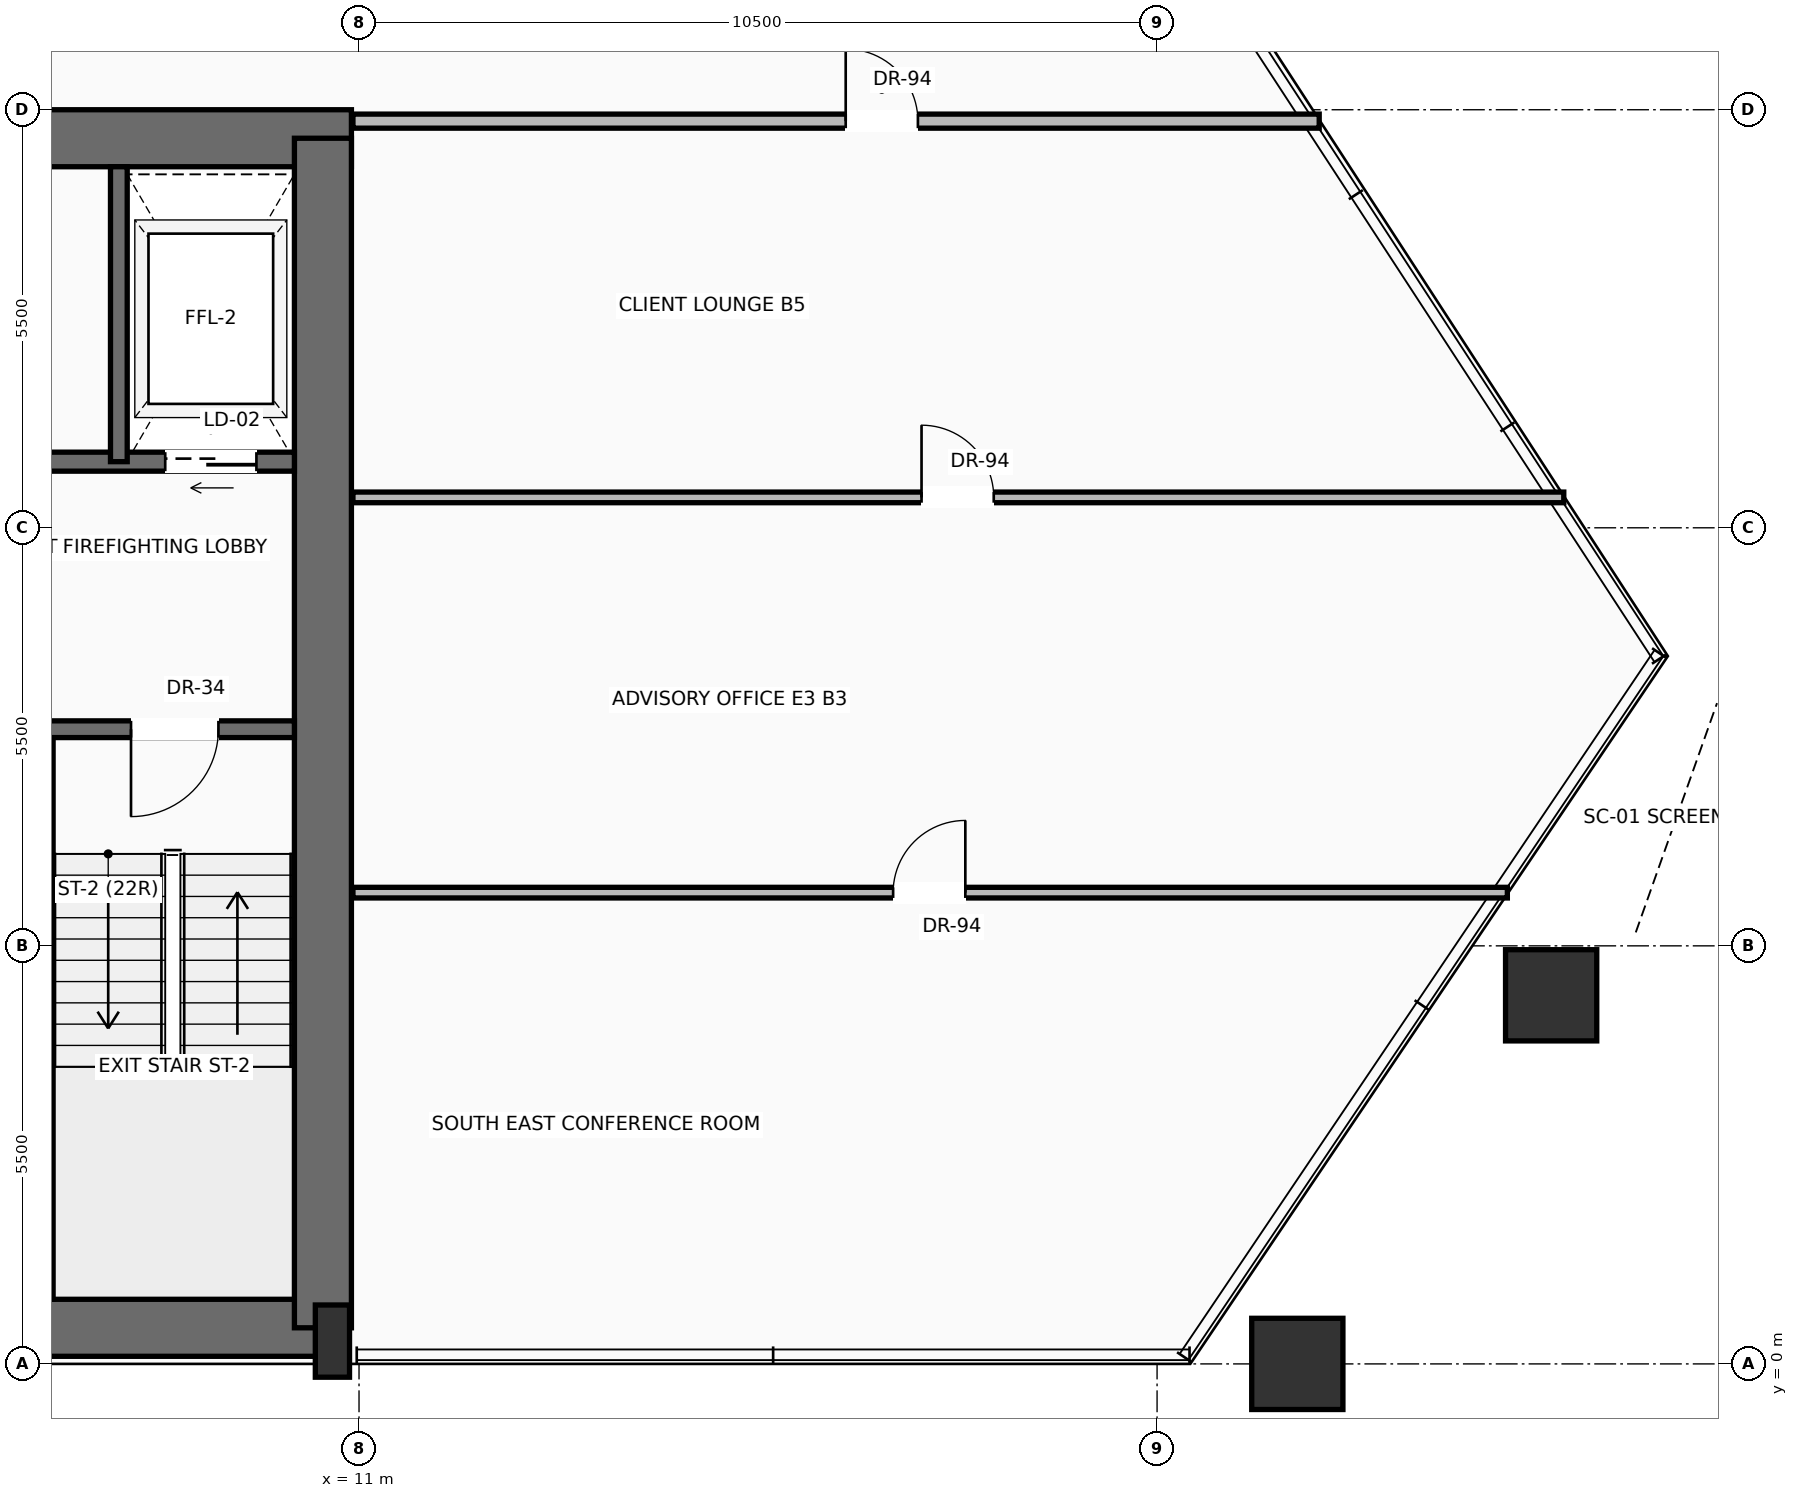
"""IFC4 building model, lengths in metres.
Left out: names, types, materials, properties, quantities, classifications, styles, units other than length and angle.
Written with IfcOpenShell. Run it as: python <this file> out.ifc"""

import sys

from ifc_helpers import new_model, si_unit, direction, frame, frame_2d, origin, origin_2d, place, context, subcontext, project, spatial, rectangle, hollow_rectangle, extrude, source, transform, mapped, element, fill, save


model = new_model("IFC4")
c1 = context("Model", 3, precision=1e-05, world=origin(), true_north=direction((0.0, 1.0)))
c2 = subcontext(c1, "Body", "Model", "MODEL_VIEW")
j1 = project(units=[si_unit("LENGTHUNIT", "METRE"), si_unit("PLANEANGLEUNIT", "RADIAN")], contexts=[c1])
p1 = place(None, origin())
s1 = spatial("IfcSite", under=j1, at=p1, CompositionType="ELEMENT")
p2 = place(p1, origin())
s2 = spatial("IfcBuilding", under=s1, at=p2, CompositionType="ELEMENT")
p3 = place(p2, frame((0.0, 0.0, 87.7)))
s3 = spatial("IfcBuildingStorey", under=s2, at=p3, CompositionType="ELEMENT", Elevation=87.7)
p4 = place(p3, frame((-10.65, 0.475, 0.0), z_axis=(0.0, 0.0, 1.0), x_axis=(1.0, 0.0, 0.0)))
e1 = element("IfcWall", 1, at=p4, inside=s3, PredefinedType="SHEAR", context=c2, shape_type="SweptSolid", body=[
    extrude(rectangle(XDim=21.3, YDim=0.75, at=frame_2d((10.65, 0.0))), origin(), (0.0, 0.0, 1.0), 3.45),
])
p5 = place(p3, frame((-10.9, 16.125, 0.0), z_axis=(0.0, 0.0, 1.0), x_axis=(1.0, 0.0, 0.0)))
e2 = element("IfcWall", 2, at=p5, inside=s3, PredefinedType="SHEAR", context=c2, shape_type="SweptSolid", body=[
    extrude(rectangle(XDim=21.8, YDim=0.75, at=frame_2d((10.9, 0.0))), origin(), (0.0, 0.0, 1.0), 3.45),
])
p6 = place(p5, frame((3.47, 0.0, 0.0)))
e3 = element("IfcOpeningElement", 3, at=p6, cuts=e2, PredefinedType="OPENING", context=c2, shape_type="SweptSolid", body=[
    extrude(rectangle(XDim=1.3, YDim=2.3, at=frame_2d((0.65, 1.15))), frame((0.0, 0.385, 0.0), z_axis=(0.0, -1.0, 0.0), x_axis=(1.0, 0.0, 0.0)), (0.0, 0.0, 1.0), 0.77),
])
p7 = place(p5, frame((9.9, 0.0, 0.0)))
e4 = element("IfcOpeningElement", 4, at=p7, cuts=e2, PredefinedType="OPENING", context=c2, shape_type="SweptSolid", body=[
    extrude(rectangle(XDim=2.0, YDim=2.4, at=frame_2d((1.0, 1.2))), frame((0.0, 0.385, 0.0), z_axis=(0.0, -1.0, 0.0), x_axis=(1.0, 0.0, 0.0)), (0.0, 0.0, 1.0), 0.77),
])
p8 = place(p3, frame((10.525, 0.475, 0.0), z_axis=(0.0, 0.0, 1.0), x_axis=(0.0, 1.0, 0.0)))
e5 = element("IfcWall", 5, at=p8, inside=s3, PredefinedType="SHEAR", context=c2, shape_type="SweptSolid", body=[
    extrude(rectangle(XDim=15.65, YDim=0.75, at=frame_2d((7.825, 0.0))), origin(), (0.0, 0.0, 1.0), 3.45),
])
m1 = source(origin(), c2, "Body", "SweptSolid", [
    extrude(rectangle(XDim=0.45, YDim=0.95, at=origin_2d()), origin(), (0.0, 0.0, 1.0), 3.7),
])
p9 = place(p3, frame((10.65, 0.3, 0.0), z_axis=(0.0, 0.0, 1.0), x_axis=(1.0, 0.0, 0.0)))
e6 = element("IfcColumn", 6, at=p9, inside=s3, PredefinedType="PILASTER", context=c2, shape_type="MappedRepresentation", body=[
    mapped(m1, transform((0.0, 0.0, 0.0), scale=1.0)),
])
m2 = source(origin(), c2, "Body", "SweptSolid", [
    extrude(hollow_rectangle(XDim=1.2, YDim=1.2, WallThickness=0.06, at=origin_2d()), origin(), (0.0, 0.0, 1.0), 3.691),
])
p10 = place(p3, frame((23.345, 0.0, 0.004), z_axis=(0.01256597649, 0.0, 0.999921045), x_axis=(0.0, 1.0, 0.0)))
e7 = element("IfcColumn", 7, at=p10, inside=s3, PredefinedType="COLUMN", context=c2, shape_type="MappedRepresentation", body=[
    mapped(m2, transform((0.0, 0.0, 0.0), scale=1.0)),
])
m3 = source(origin(), c2, "Body", "SweptSolid", [
    extrude(hollow_rectangle(XDim=1.2, YDim=1.2, WallThickness=0.06, at=origin_2d()), origin(), (0.0, 0.0, 1.0), 3.692),
])
p11 = place(p3, frame((26.685, 4.849, 0.004), z_axis=(0.000264533588, -0.016070415444, 0.999870827542), x_axis=(0.999864546824, 0.016458675668, 0.0)))
e8 = element("IfcColumn", 8, at=p11, inside=s3, PredefinedType="COLUMN", context=c2, shape_type="MappedRepresentation", body=[
    mapped(m3, transform((0.0, 0.0, 0.0), scale=1.0)),
])
p12 = place(p3, frame((6.85, 0.85, 0.0), z_axis=(0.0, 0.0, 1.0), x_axis=(0.0, 1.0, 0.0)))
e9 = element("IfcWall", 9, at=p12, inside=s3, PredefinedType="SOLIDWALL", context=c2, shape_type="SweptSolid", body=[
    extrude(rectangle(XDim=7.5, YDim=0.25, at=frame_2d((3.75, 0.0))), origin(), (0.0, 0.0, 1.0), 3.45),
])
p13 = place(p3, frame((10.15, 8.35, 0.0), z_axis=(0.0, 0.0, 1.0), x_axis=(-1.0, 0.0, 0.0)))
e10 = element("IfcWall", 10, at=p13, inside=s3, PredefinedType="SOLIDWALL", context=c2, shape_type="SweptSolid", body=[
    extrude(rectangle(XDim=4.65, YDim=0.22, at=frame_2d((2.325, 0.0))), origin(), (0.0, 0.0, 1.0), 3.45),
])
p14 = place(p13, frame((1.0, 0.0, 0.0)))
e11 = element("IfcOpeningElement", 11, at=p14, cuts=e10, PredefinedType="OPENING", context=c2, shape_type="SweptSolid", body=[
    extrude(rectangle(XDim=1.15, YDim=2.2, at=frame_2d((0.575, 1.1))), frame((0.0, 0.12, 0.0), z_axis=(0.0, -1.0, 0.0), x_axis=(1.0, 0.0, 0.0)), (0.0, 0.0, 1.0), 0.24),
])
p15 = place(p3, frame((10.15, 11.87, 0.0), z_axis=(0.0, 0.0, 1.0), x_axis=(-1.0, 0.0, 0.0)))
e12 = element("IfcWall", 12, at=p15, inside=s3, PredefinedType="SOLIDWALL", context=c2, shape_type="SweptSolid", body=[
    extrude(rectangle(XDim=4.65, YDim=0.25, at=frame_2d((2.325, 0.0))), origin(), (0.0, 0.0, 1.0), 3.45),
])
p16 = place(p15, frame((0.5, 0.0, 0.0)))
e13 = element("IfcOpeningElement", 13, at=p16, cuts=e12, PredefinedType="OPENING", context=c2, shape_type="SweptSolid", body=[
    extrude(rectangle(XDim=1.2, YDim=2.25, at=frame_2d((0.6, 1.125))), frame((0.0, 0.135, 0.0), z_axis=(0.0, -1.0, 0.0), x_axis=(1.0, 0.0, 0.0)), (0.0, 0.0, 1.0), 0.27),
])
p17 = place(p3, frame((7.84, 11.87, 0.0), z_axis=(0.0, 0.0, 1.0), x_axis=(0.0, 1.0, 0.0)))
e14 = element("IfcWall", 14, at=p17, inside=s3, PredefinedType="SOLIDWALL", context=c2, shape_type="SweptSolid", body=[
    extrude(rectangle(XDim=3.88, YDim=0.22, at=frame_2d((1.94, 0.0))), origin(), (0.0, 0.0, 1.0), 3.45),
])
p18 = place(p3, frame((10.92, 16.35, 0.0), z_axis=(0.0, 0.0, 1.0), x_axis=(1.0, 0.0, 0.0)))
e15 = element("IfcWall", 15, at=p18, inside=s3, PredefinedType="PARTITIONING", context=c2, shape_type="SweptSolid", body=[
    extrude(rectangle(XDim=12.713, YDim=0.185, at=frame_2d((6.357, 0.0))), origin(), (0.0, 0.0, 1.0), 2.747),
])
p19 = place(p18, frame((6.483, 0.0, 0.0)))
e16 = element("IfcOpeningElement", 16, at=p19, cuts=e15, PredefinedType="OPENING", context=c2, shape_type="SweptSolid", body=[
    extrude(rectangle(XDim=0.95, YDim=2.2, at=frame_2d((0.475, 1.1))), frame((0.0, 0.103, 0.0), z_axis=(0.0, -1.0, 0.0), x_axis=(1.0, 0.0, 0.0)), (0.0, 0.0, 1.0), 0.205),
])
p20 = place(p3, frame((10.92, 6.2, 0.0), z_axis=(0.0, 0.0, 1.0), x_axis=(1.0, 0.0, 0.0)))
e17 = element("IfcWall", 17, at=p20, inside=s3, PredefinedType="PARTITIONING", context=c2, shape_type="SweptSolid", body=[
    extrude(rectangle(XDim=15.189, YDim=0.14, at=frame_2d((7.594, 0.0))), origin(), (0.0, 0.0, 1.0), 2.979),
])
p21 = place(p20, frame((7.107, 0.0, 0.0)))
e18 = element("IfcOpeningElement", 18, at=p21, cuts=e17, PredefinedType="OPENING", context=c2, shape_type="SweptSolid", body=[
    extrude(rectangle(XDim=0.95, YDim=2.2, at=frame_2d((0.475, 1.1))), frame((0.0, 0.08, 0.0), z_axis=(0.0, -1.0, 0.0), x_axis=(1.0, 0.0, 0.0)), (0.0, 0.0, 1.0), 0.16),
])
p22 = place(p3, frame((10.92, 11.4, 0.0), z_axis=(0.0, 0.0, 1.0), x_axis=(1.0, 0.0, 0.0)))
e19 = element("IfcWall", 19, at=p22, inside=s3, PredefinedType="PARTITIONING", context=c2, shape_type="SweptSolid", body=[
    extrude(rectangle(XDim=15.931, YDim=0.14, at=frame_2d((7.966, 0.0))), origin(), (0.0, 0.0, 1.0), 3.442),
])
p23 = place(p22, frame((7.481, 0.0, 0.0)))
e20 = element("IfcOpeningElement", 20, at=p23, cuts=e19, PredefinedType="OPENING", context=c2, shape_type="SweptSolid", body=[
    extrude(rectangle(XDim=0.95, YDim=2.2, at=frame_2d((0.475, 1.1))), frame((0.0, 0.08, 0.0), z_axis=(0.0, -1.0, 0.0), x_axis=(1.0, 0.0, 0.0)), (0.0, 0.0, 1.0), 0.16),
])
m4 = source(origin(), c2, "Body", "SweptSolid", [
    extrude(rectangle(XDim=1.15, YDim=2.2, at=frame_2d((0.575, 1.1))), frame((0.0, 0.025, 0.0), z_axis=(0.0, -1.0, 0.0), x_axis=(1.0, 0.0, 0.0)), (0.0, 0.0, 1.0), 0.05),
])
p24 = place(p14, origin())
e21 = element("IfcDoor", 21, at=p24, inside=s3, OperationType="SINGLE_SWING_RIGHT", PredefinedType="DOOR", context=c2, shape_type="MappedRepresentation", body=[
    mapped(m4, transform((0.0, 0.0, 0.0), scale=1.0)),
])
fill(e11, e21)
m5 = source(origin(), c2, "Body", "SweptSolid", [
    extrude(rectangle(XDim=1.2, YDim=2.25, at=frame_2d((0.6, 1.125))), frame((0.0, 0.025, 0.0), z_axis=(0.0, -1.0, 0.0), x_axis=(1.0, 0.0, 0.0)), (0.0, 0.0, 1.0), 0.05),
])
p25 = place(p16, origin())
e22 = element("IfcDoor", 22, at=p25, inside=s3, OperationType="SLIDING_TO_RIGHT", PredefinedType="DOOR", context=c2, shape_type="MappedRepresentation", body=[
    mapped(m5, transform((0.0, 0.0, 0.0), scale=1.0)),
])
fill(e13, e22)
m6 = source(origin(), c2, "Body", "SweptSolid", [
    extrude(rectangle(XDim=0.95, YDim=2.2, at=frame_2d((0.475, 1.1))), frame((0.0, 0.025, 0.0), z_axis=(0.0, -1.0, 0.0), x_axis=(1.0, 0.0, 0.0)), (0.0, 0.0, 1.0), 0.05),
])
p26 = place(p19, origin())
e23 = element("IfcDoor", 23, at=p26, inside=s3, OperationType="SINGLE_SWING_LEFT", PredefinedType="DOOR", context=c2, shape_type="MappedRepresentation", body=[
    mapped(m6, transform((0.0, 0.0, 0.0), scale=1.0)),
])
fill(e16, e23)
p27 = place(p23, origin())
e24 = element("IfcDoor", 24, at=p27, inside=s3, OperationType="SINGLE_SWING_LEFT", PredefinedType="DOOR", context=c2, shape_type="MappedRepresentation", body=[
    mapped(m6, transform((0.0, 0.0, 0.0), scale=1.0)),
])
fill(e20, e24)
p28 = place(p21, origin())
e25 = element("IfcDoor", 25, at=p28, inside=s3, OperationType="SINGLE_SWING_RIGHT", PredefinedType="DOOR", context=c2, shape_type="MappedRepresentation", body=[
    mapped(m6, transform((0.0, 0.0, 0.0), scale=1.0)),
])
fill(e18, e25)
save(model, sys.argv[1])
